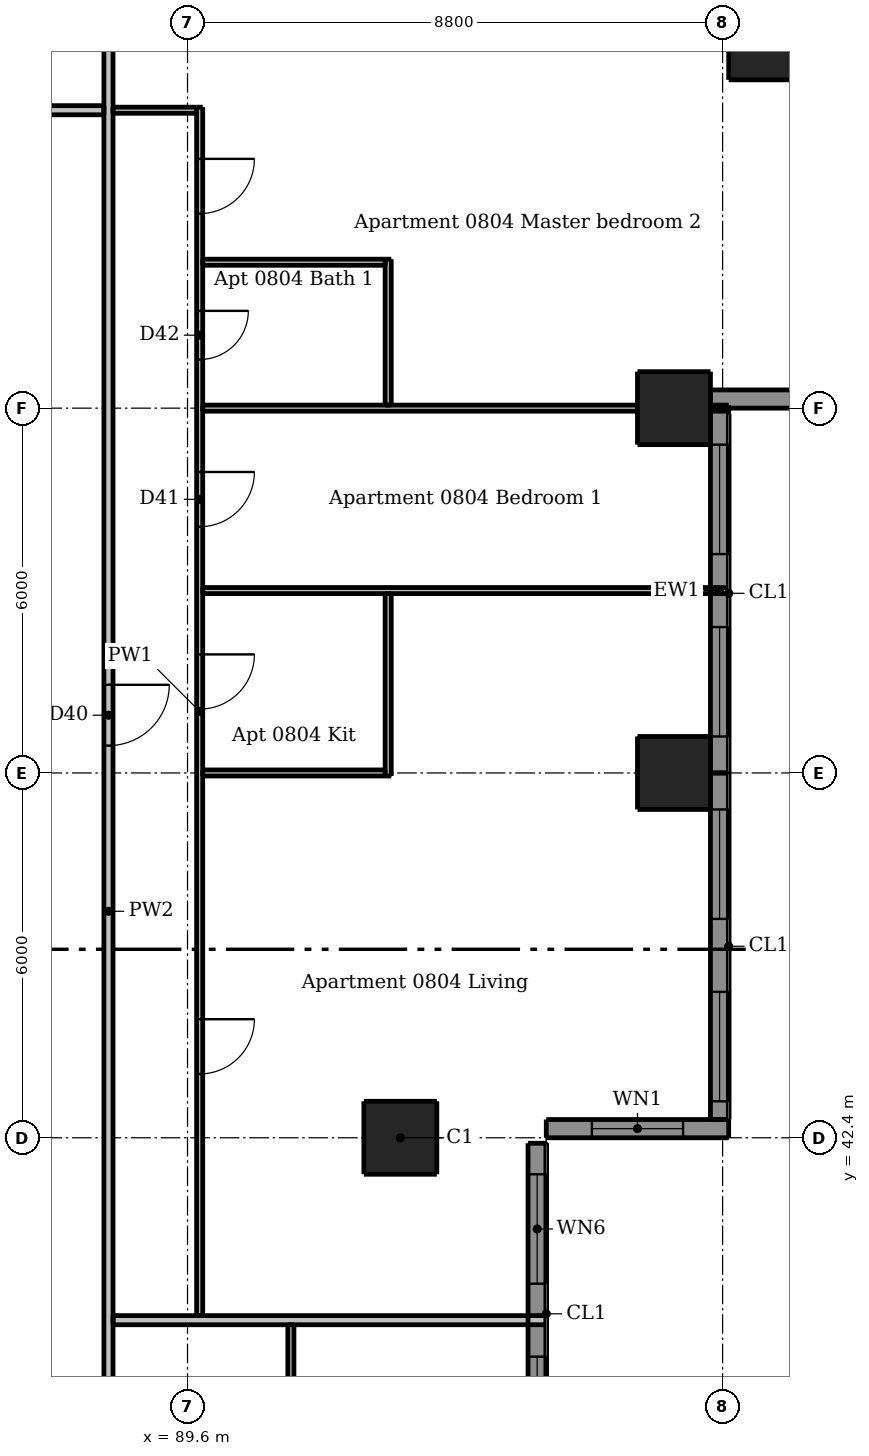
"""IFC4 building model, lengths in metres.
Left out: names, types, materials, properties, quantities, classifications, styles, units other than length and angle.
Written with IfcOpenShell. Run it as: python <this file> out.ifc"""

import sys

from ifc_helpers import new_model, si_unit, direction, frame, frame_2d, origin, origin_2d, place, context, subcontext, project, spatial, rectangle, extrude, element, fill, save


model = new_model("IFC4")
c1 = context("Model", 3, precision=1e-05, world=origin(), true_north=direction((0.0, 1.0)))
c2 = subcontext(c1, "Body", "Model", "MODEL_VIEW")
j1 = project(units=[si_unit("LENGTHUNIT", "METRE"), si_unit("PLANEANGLEUNIT", "RADIAN")], contexts=[c1])
p1 = place(None, origin())
s1 = spatial("IfcSite", under=j1, at=p1, CompositionType="ELEMENT")
p2 = place(p1, origin())
s2 = spatial("IfcBuilding", under=s1, at=p2, CompositionType="ELEMENT")
p3 = place(p2, frame((0.0, 0.0, 33.4)))
s3 = spatial("IfcBuildingStorey", under=s2, at=p3, CompositionType="ELEMENT", Elevation=33.4)
for number, where, z_axis, x_axis in (
    (1, (93.1, 42.4, 0.0), (0.0, 0.0, 1.0), (1.0, 0.0, 0.0)),
    (2, (97.6, 48.4, 0.0), (0.0, 0.0, 1.0), (1.0, 0.0, 0.0)),
    (3, (97.6, 54.4, 0.0), (0.0, 0.0, 1.0), (1.0, 0.0, 0.0)),
    (4, (99.1, 60.4, 0.0), (0.0, 0.0, 1.0), (1.0, 0.0, 0.0)),
):
    element("IfcColumn", number, at=place(p3, frame(where, z_axis=z_axis, x_axis=x_axis)), inside=s3, PredefinedType="COLUMN", context=c2, shape_type="SweptSolid", body=[
        extrude(rectangle(XDim=1.2, YDim=1.2, at=origin_2d()), origin(), (0.0, 0.0, 1.0), 3.05),
    ])
p4 = place(p3, frame((95.5, 42.55, 0.0), z_axis=(0.0, 0.0, 1.0), x_axis=(1.0, 0.0, 0.0)))
e5 = element("IfcWall", 5, at=p4, inside=s3, PredefinedType="SOLIDWALL", context=c2, shape_type="SweptSolid", body=[
    extrude(rectangle(XDim=3.0, YDim=0.3, at=frame_2d((1.5, 0.0))), origin(), (0.0, 0.0, 1.0), 3.05),
])
p5 = place(p4, frame((0.75, 0.0, 0.9)))
e6 = element("IfcOpeningElement", 6, at=p5, cuts=e5, PredefinedType="OPENING", context=c2, shape_type="SweptSolid", body=[
    extrude(rectangle(XDim=1.5, YDim=1.5, at=frame_2d((0.75, 0.75))), frame((0.0, 0.16, 0.0), z_axis=(0.0, -1.0, 0.0), x_axis=(1.0, 0.0, 0.0)), (0.0, 0.0, 1.0), 0.32),
])
p6 = place(p3, frame((98.2, 54.55, 0.0), z_axis=(0.0, 0.0, 1.0), x_axis=(1.0, 0.0, 0.0)))
e7 = element("IfcWall", 7, at=p6, inside=s3, PredefinedType="SOLIDWALL", context=c2, shape_type="SweptSolid", body=[
    extrude(rectangle(XDim=1.8, YDim=0.3, at=frame_2d((0.9, 0.0))), origin(), (0.0, 0.0, 1.0), 3.05),
])
p7 = place(p3, frame((95.35, 36.7, 0.0), z_axis=(0.0, 0.0, 1.0), x_axis=(0.0, 1.0, 0.0)))
e8 = element("IfcWall", 8, at=p7, inside=s3, PredefinedType="SOLIDWALL", context=c2, shape_type="SweptSolid", body=[
    extrude(rectangle(XDim=5.61, YDim=0.3, at=frame_2d((2.805, 0.0))), origin(), (0.0, 0.0, 1.0), 3.05),
])
p8 = place(p7, frame((0.3, 0.0, 0.15)))
e9 = element("IfcOpeningElement", 9, at=p8, cuts=e8, PredefinedType="OPENING", context=c2, shape_type="SweptSolid", body=[
    extrude(rectangle(XDim=1.8, YDim=2.1, at=frame_2d((0.9, 1.05))), frame((0.0, 0.16, 0.0), z_axis=(0.0, -1.0, 0.0), x_axis=(1.0, 0.0, 0.0)), (0.0, 0.0, 1.0), 0.32),
])
p9 = place(p7, frame((3.3, 0.0, 0.15)))
e10 = element("IfcOpeningElement", 10, at=p9, cuts=e8, PredefinedType="OPENING", context=c2, shape_type="SweptSolid", body=[
    extrude(rectangle(XDim=1.8, YDim=2.1, at=frame_2d((0.9, 1.05))), frame((0.0, 0.16, 0.0), z_axis=(0.0, -1.0, 0.0), x_axis=(1.0, 0.0, 0.0)), (0.0, 0.0, 1.0), 0.32),
])
p10 = place(p3, frame((98.35, 42.7, 0.0), z_axis=(0.0, 0.0, 1.0), x_axis=(0.0, 1.0, 0.0)))
e11 = element("IfcWall", 11, at=p10, inside=s3, PredefinedType="SOLIDWALL", context=c2, shape_type="SweptSolid", body=[
    extrude(rectangle(XDim=5.7, YDim=0.3, at=frame_2d((2.85, 0.0))), origin(), (0.0, 0.0, 1.0), 3.05),
])
p11 = place(p10, frame((0.3, 0.0, 0.15)))
e12 = element("IfcOpeningElement", 12, at=p11, cuts=e11, PredefinedType="OPENING", context=c2, shape_type="SweptSolid", body=[
    extrude(rectangle(XDim=1.8, YDim=2.1, at=frame_2d((0.9, 1.05))), frame((0.0, 0.16, 0.0), z_axis=(0.0, -1.0, 0.0), x_axis=(1.0, 0.0, 0.0)), (0.0, 0.0, 1.0), 0.32),
])
p12 = place(p10, frame((3.3, 0.0, 0.15)))
e13 = element("IfcOpeningElement", 13, at=p12, cuts=e11, PredefinedType="OPENING", context=c2, shape_type="SweptSolid", body=[
    extrude(rectangle(XDim=1.8, YDim=2.1, at=frame_2d((0.9, 1.05))), frame((0.0, 0.16, 0.0), z_axis=(0.0, -1.0, 0.0), x_axis=(1.0, 0.0, 0.0)), (0.0, 0.0, 1.0), 0.32),
])
p13 = place(p3, frame((98.35, 48.4, 0.0), z_axis=(0.0, 0.0, 1.0), x_axis=(0.0, 1.0, 0.0)))
e14 = element("IfcWall", 14, at=p13, inside=s3, PredefinedType="SOLIDWALL", context=c2, shape_type="SweptSolid", body=[
    extrude(rectangle(XDim=6.0, YDim=0.3, at=frame_2d((3.0, 0.0))), origin(), (0.0, 0.0, 1.0), 3.05),
])
p14 = place(p13, frame((0.6, 0.0, 0.15)))
e15 = element("IfcOpeningElement", 15, at=p14, cuts=e14, PredefinedType="OPENING", context=c2, shape_type="SweptSolid", body=[
    extrude(rectangle(XDim=1.8, YDim=2.1, at=frame_2d((0.9, 1.05))), frame((0.0, 0.16, 0.0), z_axis=(0.0, -1.0, 0.0), x_axis=(1.0, 0.0, 0.0)), (0.0, 0.0, 1.0), 0.32),
])
p15 = place(p13, frame((3.6, 0.0, 0.15)))
e16 = element("IfcOpeningElement", 16, at=p15, cuts=e14, PredefinedType="OPENING", context=c2, shape_type="SweptSolid", body=[
    extrude(rectangle(XDim=1.8, YDim=2.1, at=frame_2d((0.9, 1.05))), frame((0.0, 0.16, 0.0), z_axis=(0.0, -1.0, 0.0), x_axis=(1.0, 0.0, 0.0)), (0.0, 0.0, 1.0), 0.32),
])
p16 = place(p3, frame((89.8, 59.35, 0.0), z_axis=(0.0, 0.0, 1.0), x_axis=(0.0, -1.0, 0.0)))
e17 = element("IfcWall", 17, at=p16, inside=s3, PredefinedType="PARTITIONING", context=c2, shape_type="SweptSolid", body=[
    extrude(rectangle(XDim=19.875, YDim=0.1, at=frame_2d((9.938, 0.0))), origin(), (0.0, 0.0, 1.0), 3.05),
])
p17 = place(p16, frame((15.0, 0.0, 0.0)))
e18 = element("IfcOpeningElement", 18, at=p17, cuts=e17, PredefinedType="OPENING", context=c2, shape_type="SweptSolid", body=[
    extrude(rectangle(XDim=0.9, YDim=2.1, at=frame_2d((0.45, 1.05))), frame((0.0, 0.06, 0.0), z_axis=(0.0, -1.0, 0.0), x_axis=(1.0, 0.0, 0.0)), (0.0, 0.0, 1.0), 0.12),
])
p18 = place(p16, frame((9.0, 0.0, 0.0)))
e19 = element("IfcOpeningElement", 19, at=p18, cuts=e17, PredefinedType="OPENING", context=c2, shape_type="SweptSolid", body=[
    extrude(rectangle(XDim=0.9, YDim=2.1, at=frame_2d((0.45, 1.05))), frame((0.0, 0.06, 0.0), z_axis=(0.0, -1.0, 0.0), x_axis=(1.0, 0.0, 0.0)), (0.0, 0.0, 1.0), 0.12),
])
p19 = place(p16, frame((6.0, 0.0, 0.0)))
e20 = element("IfcOpeningElement", 20, at=p19, cuts=e17, PredefinedType="OPENING", context=c2, shape_type="SweptSolid", body=[
    extrude(rectangle(XDim=0.9, YDim=2.1, at=frame_2d((0.45, 1.05))), frame((0.0, 0.06, 0.0), z_axis=(0.0, -1.0, 0.0), x_axis=(1.0, 0.0, 0.0)), (0.0, 0.0, 1.0), 0.12),
])
p20 = place(p16, frame((0.85, 0.0, 0.0)))
e21 = element("IfcOpeningElement", 21, at=p20, cuts=e17, PredefinedType="OPENING", context=c2, shape_type="SweptSolid", body=[
    extrude(rectangle(XDim=0.9, YDim=2.1, at=frame_2d((0.45, 1.05))), frame((0.0, 0.06, 0.0), z_axis=(0.0, -1.0, 0.0), x_axis=(1.0, 0.0, 0.0)), (0.0, 0.0, 1.0), 0.12),
])
p21 = place(p16, frame((3.35, 0.0, 0.0)))
e22 = element("IfcOpeningElement", 22, at=p21, cuts=e17, PredefinedType="OPENING", context=c2, shape_type="SweptSolid", body=[
    extrude(rectangle(XDim=0.8, YDim=2.1, at=frame_2d((0.4, 1.05))), frame((0.0, 0.06, 0.0), z_axis=(0.0, -1.0, 0.0), x_axis=(1.0, 0.0, 0.0)), (0.0, 0.0, 1.0), 0.12),
])
p22 = place(p3, frame((91.3, 33.45, 0.0), z_axis=(0.0, 0.0, 1.0), x_axis=(0.0, 1.0, 0.0)))
e23 = element("IfcWall", 23, at=p22, inside=s3, PredefinedType="PARTITIONING", context=c2, shape_type="SweptSolid", body=[
    extrude(rectangle(XDim=5.875, YDim=0.1, at=frame_2d((2.938, 0.0))), origin(), (0.0, 0.0, 1.0), 3.05),
])
p23 = place(p22, frame((3.75, 0.0, 0.0)))
e24 = element("IfcOpeningElement", 24, at=p23, cuts=e23, PredefinedType="OPENING", context=c2, shape_type="SweptSolid", body=[
    extrude(rectangle(XDim=0.8, YDim=2.1, at=frame_2d((0.4, 1.05))), frame((0.0, 0.06, 0.0), z_axis=(0.0, -1.0, 0.0), x_axis=(1.0, 0.0, 0.0)), (0.0, 0.0, 1.0), 0.12),
])
p24 = place(p3, frame((92.9, 48.35, 0.0), z_axis=(0.0, 0.0, 1.0), x_axis=(0.0, 1.0, 0.0)))
e25 = element("IfcWall", 25, at=p24, inside=s3, PredefinedType="PARTITIONING", context=c2, shape_type="SweptSolid", body=[
    extrude(rectangle(XDim=3.0, YDim=0.1, at=frame_2d((1.5, 0.0))), origin(), (0.0, 0.0, 1.0), 3.05),
])
p25 = place(p3, frame((92.9, 54.45, 0.0), z_axis=(0.0, 0.0, 1.0), x_axis=(0.0, 1.0, 0.0)))
e26 = element("IfcWall", 26, at=p25, inside=s3, PredefinedType="PARTITIONING", context=c2, shape_type="SweptSolid", body=[
    extrude(rectangle(XDim=2.4, YDim=0.1, at=frame_2d((1.2, 0.0))), origin(), (0.0, 0.0, 1.0), 3.05),
])
p26 = place(p3, frame((88.375, 59.3, 0.0), z_axis=(0.0, 0.0, 1.0), x_axis=(1.0, 0.0, 0.0)))
e27 = element("IfcWall", 27, at=p26, inside=s3, PredefinedType="PARTITIONING", context=c2, shape_type="SweptSolid", body=[
    extrude(rectangle(XDim=1.375, YDim=0.1, at=frame_2d((0.688, 0.0))), origin(), (0.0, 0.0, 1.0), 3.05),
])
p27 = place(p3, frame((89.85, 56.8, 0.0), z_axis=(0.0, 0.0, 1.0), x_axis=(1.0, 0.0, 0.0)))
e28 = element("IfcWall", 28, at=p27, inside=s3, PredefinedType="PARTITIONING", context=c2, shape_type="SweptSolid", body=[
    extrude(rectangle(XDim=3.0, YDim=0.1, at=frame_2d((1.5, 0.0))), origin(), (0.0, 0.0, 1.0), 3.05),
])
p28 = place(p3, frame((89.85, 54.4, 0.0), z_axis=(0.0, 0.0, 1.0), x_axis=(1.0, 0.0, 0.0)))
e29 = element("IfcWall", 29, at=p28, inside=s3, PredefinedType="PARTITIONING", context=c2, shape_type="SweptSolid", body=[
    extrude(rectangle(XDim=8.65, YDim=0.1, at=frame_2d((4.325, 0.0))), origin(), (0.0, 0.0, 1.0), 2.516),
])
p29 = place(p3, frame((89.85, 51.4, 0.0), z_axis=(0.0, 0.0, 1.0), x_axis=(1.0, 0.0, 0.0)))
e30 = element("IfcWall", 30, at=p29, inside=s3, PredefinedType="PARTITIONING", context=c2, shape_type="SweptSolid", body=[
    extrude(rectangle(XDim=8.65, YDim=0.1, at=frame_2d((4.325, 0.0))), origin(), (0.0, 0.0, 1.0), 3.05),
])
p30 = place(p3, frame((89.85, 48.4, 0.0), z_axis=(0.0, 0.0, 1.0), x_axis=(1.0, 0.0, 0.0)))
e31 = element("IfcWall", 31, at=p30, inside=s3, PredefinedType="PARTITIONING", context=c2, shape_type="SweptSolid", body=[
    extrude(rectangle(XDim=3.0, YDim=0.1, at=frame_2d((1.5, 0.0))), origin(), (0.0, 0.0, 1.0), 2.516),
])
p31 = place(p3, frame((88.3, 60.475, 0.0), z_axis=(0.0, 0.0, 1.0), x_axis=(0.0, -1.0, 0.0)))
e32 = element("IfcWall", 32, at=p31, inside=s3, PredefinedType="PARTITIONING", context=c2, shape_type="SweptSolid", body=[
    extrude(rectangle(XDim=28.7, YDim=0.15, at=frame_2d((14.35, 0.0))), origin(), (0.0, 0.0, 1.0), 3.05),
])
p32 = place(p31, frame((27.425, 0.0, 0.0)))
e33 = element("IfcOpeningElement", 33, at=p32, cuts=e32, PredefinedType="OPENING", context=c2, shape_type="SweptSolid", body=[
    extrude(rectangle(XDim=1.0, YDim=2.1, at=frame_2d((0.5, 1.05))), frame((0.0, 0.085, 0.0), z_axis=(0.0, -1.0, 0.0), x_axis=(1.0, 0.0, 0.0)), (0.0, 0.0, 1.0), 0.17),
])
p33 = place(p31, frame((10.625, 0.0, 0.0)))
e34 = element("IfcOpeningElement", 34, at=p33, cuts=e32, PredefinedType="OPENING", context=c2, shape_type="SweptSolid", body=[
    extrude(rectangle(XDim=1.0, YDim=2.1, at=frame_2d((0.5, 1.05))), frame((0.0, 0.085, 0.0), z_axis=(0.0, -1.0, 0.0), x_axis=(1.0, 0.0, 0.0)), (0.0, 0.0, 1.0), 0.17),
])
p34 = place(p3, frame((59.675, 59.3, 0.0), z_axis=(0.0, 0.0, 1.0), x_axis=(1.0, 0.0, 0.0)))
e35 = element("IfcWall", 35, at=p34, inside=s3, PredefinedType="PARTITIONING", context=c2, shape_type="SweptSolid", body=[
    extrude(rectangle(XDim=28.55, YDim=0.15, at=frame_2d((14.275, 0.0))), origin(), (0.0, 0.0, 1.0), 3.05),
])
p35 = place(p34, frame((8.975, 0.0, 0.0)))
e36 = element("IfcOpeningElement", 36, at=p35, cuts=e35, PredefinedType="OPENING", context=c2, shape_type="SweptSolid", body=[
    extrude(rectangle(XDim=1.0, YDim=2.1, at=frame_2d((0.5, 1.05))), frame((0.0, 0.085, 0.0), z_axis=(0.0, -1.0, 0.0), x_axis=(1.0, 0.0, 0.0)), (0.0, 0.0, 1.0), 0.17),
])
p36 = place(p34, frame((25.775, 0.0, 0.0)))
e37 = element("IfcOpeningElement", 37, at=p36, cuts=e35, PredefinedType="OPENING", context=c2, shape_type="SweptSolid", body=[
    extrude(rectangle(XDim=1.0, YDim=2.1, at=frame_2d((0.5, 1.05))), frame((0.0, 0.085, 0.0), z_axis=(0.0, -1.0, 0.0), x_axis=(1.0, 0.0, 0.0)), (0.0, 0.0, 1.0), 0.17),
])
p37 = place(p3, frame((88.375, 39.4, 0.0), z_axis=(0.0, 0.0, 1.0), x_axis=(1.0, 0.0, 0.0)))
e38 = element("IfcWall", 38, at=p37, inside=s3, PredefinedType="PARTITIONING", context=c2, shape_type="SweptSolid", body=[
    extrude(rectangle(XDim=7.125, YDim=0.15, at=frame_2d((3.562, 0.0))), origin(), (0.0, 0.0, 1.0), 3.05),
])
p38 = place(p5, origin())
e39 = element("IfcWindow", 39, at=p38, inside=s3, PartitioningType="DOUBLE_PANEL_VERTICAL", PredefinedType="WINDOW", context=c2, shape_type="SweptSolid", body=[
    extrude(rectangle(XDim=1.5, YDim=1.5, at=frame_2d((0.75, 0.75))), frame((0.0, 0.03, 0.0), z_axis=(0.0, -1.0, 0.0), x_axis=(1.0, 0.0, 0.0)), (0.0, 0.0, 1.0), 0.06),
])
fill(e6, e39)
p39 = place(p8, origin())
e40 = element("IfcWindow", 40, at=p39, inside=s3, PartitioningType="DOUBLE_PANEL_VERTICAL", PredefinedType="WINDOW", context=c2, shape_type="SweptSolid", body=[
    extrude(rectangle(XDim=1.8, YDim=2.1, at=frame_2d((0.9, 1.05))), frame((0.0, 0.03, 0.0), z_axis=(0.0, -1.0, 0.0), x_axis=(1.0, 0.0, 0.0)), (0.0, 0.0, 1.0), 0.06),
])
fill(e9, e40)
p40 = place(p9, origin())
e41 = element("IfcWindow", 41, at=p40, inside=s3, PartitioningType="DOUBLE_PANEL_VERTICAL", PredefinedType="WINDOW", context=c2, shape_type="SweptSolid", body=[
    extrude(rectangle(XDim=1.8, YDim=2.1, at=frame_2d((0.9, 1.05))), frame((0.0, 0.03, 0.0), z_axis=(0.0, -1.0, 0.0), x_axis=(1.0, 0.0, 0.0)), (0.0, 0.0, 1.0), 0.06),
])
fill(e10, e41)
p41 = place(p11, origin())
e42 = element("IfcWindow", 42, at=p41, inside=s3, PartitioningType="DOUBLE_PANEL_VERTICAL", PredefinedType="WINDOW", context=c2, shape_type="SweptSolid", body=[
    extrude(rectangle(XDim=1.8, YDim=2.1, at=frame_2d((0.9, 1.05))), frame((0.0, 0.03, 0.0), z_axis=(0.0, -1.0, 0.0), x_axis=(1.0, 0.0, 0.0)), (0.0, 0.0, 1.0), 0.06),
])
fill(e12, e42)
p42 = place(p12, origin())
e43 = element("IfcWindow", 43, at=p42, inside=s3, PartitioningType="DOUBLE_PANEL_VERTICAL", PredefinedType="WINDOW", context=c2, shape_type="SweptSolid", body=[
    extrude(rectangle(XDim=1.8, YDim=2.1, at=frame_2d((0.9, 1.05))), frame((0.0, 0.03, 0.0), z_axis=(0.0, -1.0, 0.0), x_axis=(1.0, 0.0, 0.0)), (0.0, 0.0, 1.0), 0.06),
])
fill(e13, e43)
p43 = place(p14, origin())
e44 = element("IfcWindow", 44, at=p43, inside=s3, PartitioningType="DOUBLE_PANEL_VERTICAL", PredefinedType="WINDOW", context=c2, shape_type="SweptSolid", body=[
    extrude(rectangle(XDim=1.8, YDim=2.1, at=frame_2d((0.9, 1.05))), frame((0.0, 0.03, 0.0), z_axis=(0.0, -1.0, 0.0), x_axis=(1.0, 0.0, 0.0)), (0.0, 0.0, 1.0), 0.06),
])
fill(e15, e44)
p44 = place(p15, origin())
e45 = element("IfcWindow", 45, at=p44, inside=s3, PartitioningType="DOUBLE_PANEL_VERTICAL", PredefinedType="WINDOW", context=c2, shape_type="SweptSolid", body=[
    extrude(rectangle(XDim=1.8, YDim=2.1, at=frame_2d((0.9, 1.05))), frame((0.0, 0.03, 0.0), z_axis=(0.0, -1.0, 0.0), x_axis=(1.0, 0.0, 0.0)), (0.0, 0.0, 1.0), 0.06),
])
fill(e16, e45)
p45 = place(p33, origin())
e46 = element("IfcDoor", 46, at=p45, inside=s3, OperationType="SINGLE_SWING_LEFT", PredefinedType="DOOR", context=c2, shape_type="SweptSolid", body=[
    extrude(rectangle(XDim=1.0, YDim=2.1, at=frame_2d((0.5, 1.05))), frame((0.0, 0.025, 0.0), z_axis=(0.0, -1.0, 0.0), x_axis=(1.0, 0.0, 0.0)), (0.0, 0.0, 1.0), 0.05),
])
fill(e34, e46)
p46 = place(p17, origin())
e47 = element("IfcDoor", 47, at=p46, inside=s3, OperationType="SINGLE_SWING_LEFT", PredefinedType="DOOR", context=c2, shape_type="SweptSolid", body=[
    extrude(rectangle(XDim=0.9, YDim=2.1, at=frame_2d((0.45, 1.05))), frame((0.0, 0.025, 0.0), z_axis=(0.0, -1.0, 0.0), x_axis=(1.0, 0.0, 0.0)), (0.0, 0.0, 1.0), 0.05),
])
fill(e18, e47)
p47 = place(p18, origin())
e48 = element("IfcDoor", 48, at=p47, inside=s3, OperationType="SINGLE_SWING_LEFT", PredefinedType="DOOR", context=c2, shape_type="SweptSolid", body=[
    extrude(rectangle(XDim=0.9, YDim=2.1, at=frame_2d((0.45, 1.05))), frame((0.0, 0.025, 0.0), z_axis=(0.0, -1.0, 0.0), x_axis=(1.0, 0.0, 0.0)), (0.0, 0.0, 1.0), 0.05),
])
fill(e19, e48)
p48 = place(p19, origin())
e49 = element("IfcDoor", 49, at=p48, inside=s3, OperationType="SINGLE_SWING_LEFT", PredefinedType="DOOR", context=c2, shape_type="SweptSolid", body=[
    extrude(rectangle(XDim=0.9, YDim=2.1, at=frame_2d((0.45, 1.05))), frame((0.0, 0.025, 0.0), z_axis=(0.0, -1.0, 0.0), x_axis=(1.0, 0.0, 0.0)), (0.0, 0.0, 1.0), 0.05),
])
fill(e20, e49)
p49 = place(p20, origin())
e50 = element("IfcDoor", 50, at=p49, inside=s3, OperationType="SINGLE_SWING_LEFT", PredefinedType="DOOR", context=c2, shape_type="SweptSolid", body=[
    extrude(rectangle(XDim=0.9, YDim=2.1, at=frame_2d((0.45, 1.05))), frame((0.0, 0.025, 0.0), z_axis=(0.0, -1.0, 0.0), x_axis=(1.0, 0.0, 0.0)), (0.0, 0.0, 1.0), 0.05),
])
fill(e21, e50)
p50 = place(p21, origin())
e51 = element("IfcDoor", 51, at=p50, inside=s3, OperationType="SINGLE_SWING_LEFT", PredefinedType="DOOR", context=c2, shape_type="SweptSolid", body=[
    extrude(rectangle(XDim=0.8, YDim=2.1, at=frame_2d((0.4, 1.05))), frame((0.0, 0.025, 0.0), z_axis=(0.0, -1.0, 0.0), x_axis=(1.0, 0.0, 0.0)), (0.0, 0.0, 1.0), 0.05),
])
fill(e22, e51)
save(model, sys.argv[1])
